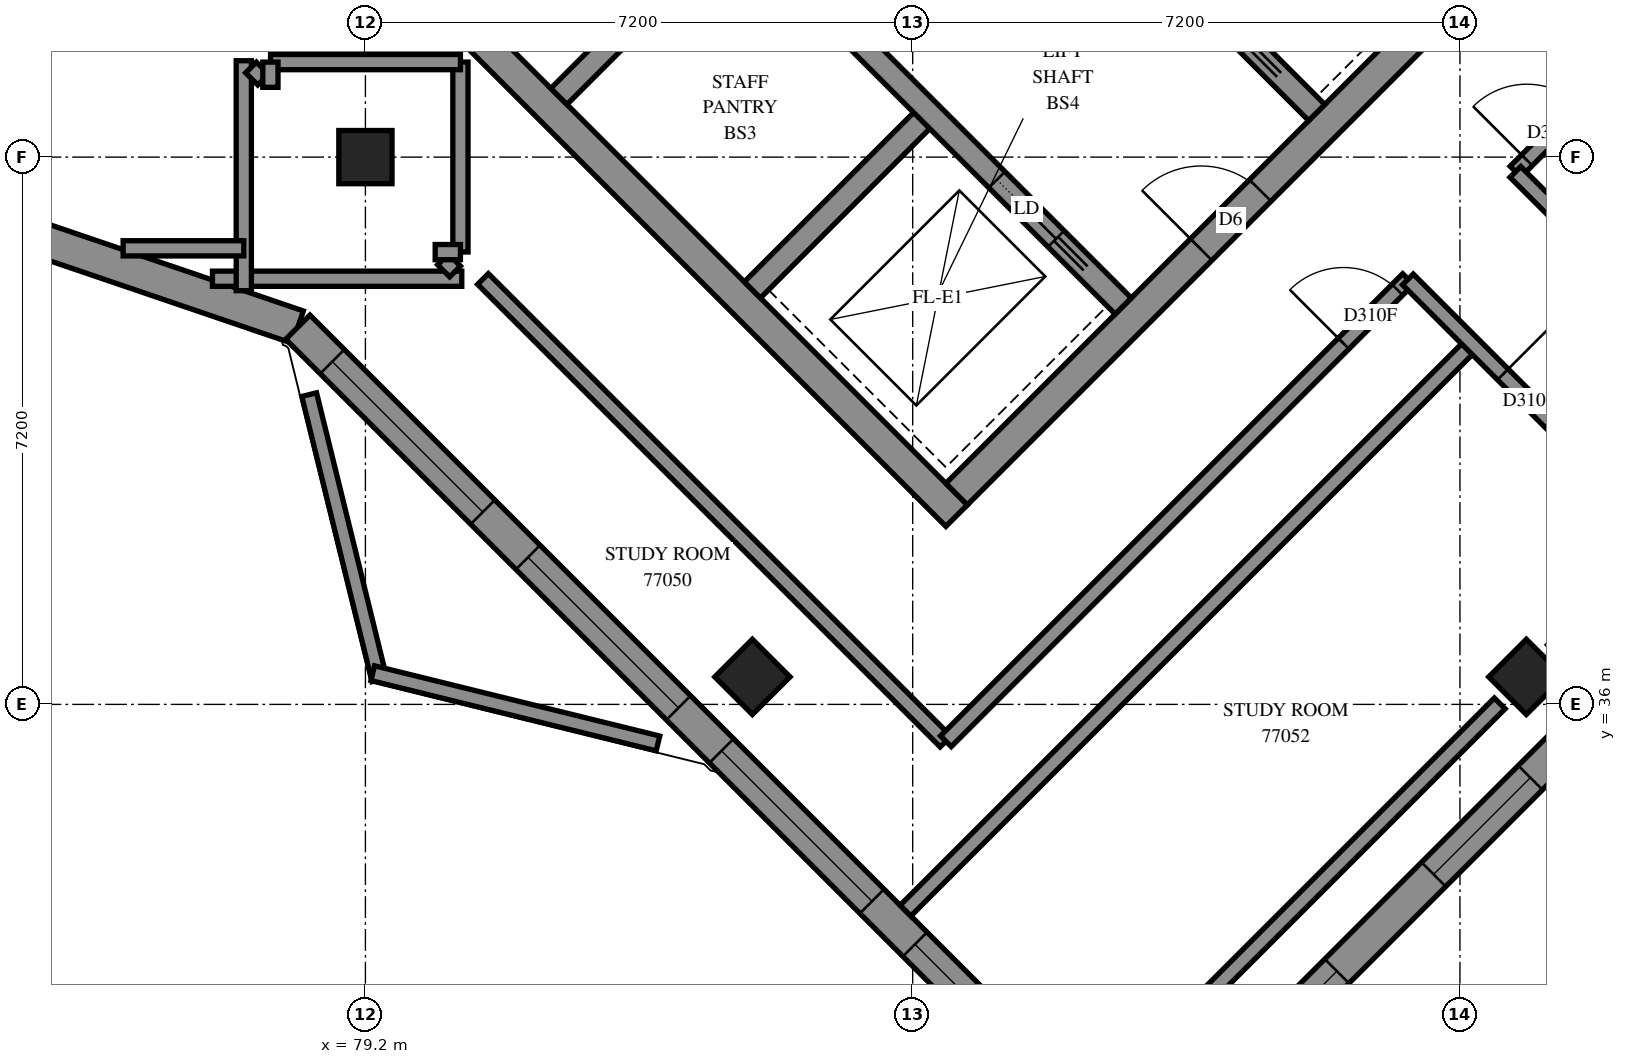
"""IFC4 building model, lengths in metres.
Left out: names, types, materials, properties, quantities, classifications, styles, units other than length and angle.
Written with IfcOpenShell. Run it as: python <this file> out.ifc"""

import sys

from ifc_helpers import new_model, si_unit, direction, frame, frame_2d, origin, origin_2d, place, context, subcontext, project, spatial, polyline, rectangle, outline, extrude, element, fill, save


model = new_model("IFC4")
c1 = context("Model", 3, precision=1e-05, world=origin(), true_north=direction((0.0, 1.0)))
c2 = subcontext(c1, "Body", "Model", "MODEL_VIEW")
j1 = project(units=[si_unit("LENGTHUNIT", "METRE"), si_unit("PLANEANGLEUNIT", "RADIAN")], contexts=[c1])
p1 = place(None, origin())
s1 = spatial("IfcSite", under=j1, at=p1, CompositionType="ELEMENT")
p2 = place(p1, origin())
s2 = spatial("IfcBuilding", under=s1, at=p2, CompositionType="ELEMENT")
p3 = place(p2, frame((0.0, 0.0, 281.2)))
s3 = spatial("IfcBuildingStorey", under=s2, at=p3, CompositionType="ELEMENT", Elevation=281.2)
for number, where, z_axis, x_axis in (
    (1, (79.2, 43.2, 0.0), (0.0, 0.0, 1.0), (1.0, 0.0, 0.0)),
    (2, (84.291, 36.362, 0.0), (0.0, 0.0, 1.0), (0.707, -0.707, 0.0)),
    (3, (94.474, 36.362, 0.0), (0.0, 0.0, 1.0), (0.707, -0.707, 0.0)),
):
    element("IfcColumn", number, at=place(p3, frame(where, z_axis=z_axis, x_axis=x_axis)), inside=s3, PredefinedType="COLUMN", context=c2, shape_type="SweptSolid", body=[
        extrude(rectangle(XDim=0.7, YDim=0.7, at=origin_2d()), origin(), (0.0, 0.0, 1.0), 3.1),
    ])
p4 = place(p3, frame((76.23, 49.231, -0.3), z_axis=(0.0, 0.0, 1.0), x_axis=(0.7071034917, -0.7071100706, 0.0)))
e4 = element("IfcWall", 4, at=p4, inside=s3, PredefinedType="SHEAR", context=c2, shape_type="SweptSolid", body=[
    extrude(rectangle(XDim=15.2, YDim=0.4, at=frame_2d((7.6, 0.0))), origin(), (0.0, 0.0, 1.0), 2.7),
])
p5 = place(p3, frame((86.978, 38.766, -0.3), z_axis=(0.0, 0.0, 1.0), x_axis=(0.7071067812, 0.7071067812, 0.0)))
e5 = element("IfcWall", 5, at=p5, inside=s3, PredefinedType="SHEAR", context=c2, shape_type="SweptSolid", body=[
    extrude(rectangle(XDim=14.4, YDim=0.4, at=frame_2d((7.2, 0.0))), origin(), (0.0, 0.0, 1.0), 2.7),
])
p6 = place(p5, frame((4.55, 0.0, 0.3)))
e6 = element("IfcOpeningElement", 6, at=p6, cuts=e5, PredefinedType="OPENING", context=c2, shape_type="SweptSolid", body=[
    extrude(rectangle(XDim=1.1, YDim=2.1, at=frame_2d((0.55, 1.05))), frame((0.0, 0.21, 0.0), z_axis=(0.0, -1.0, 0.0), x_axis=(1.0, 0.0, 0.0)), (0.0, 0.0, 1.0), 0.42),
])
p7 = place(p5, frame((11.35, 0.0, 0.3)))
e7 = element("IfcOpeningElement", 7, at=p7, cuts=e5, PredefinedType="OPENING", context=c2, shape_type="SweptSolid", body=[
    extrude(rectangle(XDim=1.1, YDim=2.1, at=frame_2d((0.55, 1.05))), frame((0.0, 0.21, 0.0), z_axis=(0.0, -1.0, 0.0), x_axis=(1.0, 0.0, 0.0)), (0.0, 0.0, 1.0), 0.42),
])
for number, where, z_axis, x_axis in (
    (8, (81.746, 43.999, 0.0), (0.0, 0.0, 1.0), (0.707, 0.707, 0.0)),
    (9, (84.291, 41.453, 0.0), (0.0, 0.0, 1.0), (0.707, 0.707, 0.0)),
):
    element("IfcWall", number, at=place(p3, frame(where, z_axis=z_axis, x_axis=x_axis)), inside=s3, PredefinedType="SOLIDWALL", context=c2, shape_type="SweptSolid", body=[
        extrude(rectangle(XDim=3.3, YDim=0.3, at=frame_2d((1.65, 0.0))), origin(), (0.0, 0.0, 1.0), 3.1),
    ])
p8 = place(p3, frame((78.988, 51.423, 0.0), z_axis=(0.0, 0.0, 1.0), x_axis=(0.7071067812, -0.7071067812, 0.0)))
e10 = element("IfcWall", 10, at=p8, inside=s3, PredefinedType="SOLIDWALL", context=c2, shape_type="SweptSolid", body=[
    extrude(rectangle(XDim=14.4, YDim=0.3, at=frame_2d((7.2, 0.0))), origin(), (0.0, 0.0, 1.0), 3.1),
])
p9 = place(p8, frame((1.35, 0.0, 0.0)))
e11 = element("IfcOpeningElement", 11, at=p9, cuts=e10, PredefinedType="OPENING", context=c2, shape_type="SweptSolid", body=[
    extrude(rectangle(XDim=0.9, YDim=2.1, at=frame_2d((0.45, 1.05))), frame((0.0, 0.16, 0.0), z_axis=(0.0, -1.0, 0.0), x_axis=(1.0, 0.0, 0.0)), (0.0, 0.0, 1.0), 0.32),
])
p10 = place(p8, frame((4.95, 0.0, 0.0)))
e12 = element("IfcOpeningElement", 12, at=p10, cuts=e10, PredefinedType="OPENING", context=c2, shape_type="SweptSolid", body=[
    extrude(rectangle(XDim=0.9, YDim=2.1, at=frame_2d((0.45, 1.05))), frame((0.0, 0.16, 0.0), z_axis=(0.0, -1.0, 0.0), x_axis=(1.0, 0.0, 0.0)), (0.0, 0.0, 1.0), 0.32),
])
p11 = place(p8, frame((8.55, 0.0, 0.0)))
e13 = element("IfcOpeningElement", 13, at=p11, cuts=e10, PredefinedType="OPENING", context=c2, shape_type="SweptSolid", body=[
    extrude(rectangle(XDim=0.9, YDim=2.1, at=frame_2d((0.45, 1.05))), frame((0.0, 0.16, 0.0), z_axis=(0.0, -1.0, 0.0), x_axis=(1.0, 0.0, 0.0)), (0.0, 0.0, 1.0), 0.32),
])
p12 = place(p8, frame((12.05, 0.0, 0.0)))
e14 = element("IfcOpeningElement", 14, at=p12, cuts=e10, PredefinedType="OPENING", context=c2, shape_type="SweptSolid", body=[
    extrude(rectangle(XDim=1.1, YDim=2.1, at=frame_2d((0.55, 1.05))), frame((0.0, 0.16, 0.0), z_axis=(0.0, -1.0, 0.0), x_axis=(1.0, 0.0, 0.0)), (0.0, 0.0, 1.0), 0.32),
])
p13 = place(p3, frame((81.534, 53.969, 0.0), z_axis=(0.0, 0.0, 1.0), x_axis=(0.707103309, -0.7071102534, 0.0)))
e15 = element("IfcWall", 15, at=p13, inside=s3, PredefinedType="SOLIDWALL", context=c2, shape_type="SweptSolid", body=[
    extrude(rectangle(XDim=14.4, YDim=0.3, at=frame_2d((7.2, 0.0))), origin(), (0.0, 0.0, 1.0), 3.1),
])
p14 = place(p13, frame((8.55, 0.0, 0.0)))
e16 = element("IfcOpeningElement", 16, at=p14, cuts=e15, PredefinedType="OPENING", context=c2, shape_type="SweptSolid", body=[
    extrude(rectangle(XDim=0.9, YDim=2.1, at=frame_2d((0.45, 1.05))), frame((0.0, 0.16, 0.0), z_axis=(0.0, -1.0, 0.0), x_axis=(1.0, 0.0, 0.0)), (0.0, 0.0, 1.0), 0.32),
])
p15 = place(p13, frame((1.25, 0.0, 0.0)))
e17 = element("IfcOpeningElement", 17, at=p15, cuts=e15, PredefinedType="OPENING", context=c2, shape_type="SweptSolid", body=[
    extrude(rectangle(XDim=1.1, YDim=2.1, at=frame_2d((0.55, 1.05))), frame((0.0, 0.16, 0.0), z_axis=(0.0, -1.0, 0.0), x_axis=(1.0, 0.0, 0.0)), (0.0, 0.0, 1.0), 0.32),
])
p16 = place(p13, frame((4.85, 0.0, 0.0)))
e18 = element("IfcOpeningElement", 18, at=p16, cuts=e15, PredefinedType="OPENING", context=c2, shape_type="SweptSolid", body=[
    extrude(rectangle(XDim=1.1, YDim=2.1, at=frame_2d((0.55, 1.05))), frame((0.0, 0.16, 0.0), z_axis=(0.0, -1.0, 0.0), x_axis=(1.0, 0.0, 0.0)), (0.0, 0.0, 1.0), 0.32),
])
p17 = place(p13, frame((12.05, 0.0, 0.0)))
e19 = element("IfcOpeningElement", 19, at=p17, cuts=e15, PredefinedType="OPENING", context=c2, shape_type="SweptSolid", body=[
    extrude(rectangle(XDim=1.1, YDim=2.1, at=frame_2d((0.55, 1.05))), frame((0.0, 0.16, 0.0), z_axis=(0.0, -1.0, 0.0), x_axis=(1.0, 0.0, 0.0)), (0.0, 0.0, 1.0), 0.32),
])
p18 = place(p3, frame((89.382, 29.892, 0.0), z_axis=(0.0, 0.0, 1.0), x_axis=(0.7071067812, 0.7071067812, 0.0)))
e20 = element("IfcWall", 20, at=p18, inside=s3, PredefinedType="SOLIDWALL", context=c2, shape_type="SweptSolid", body=[
    extrude(outline(polyline([(-0.225, -0.225), (9.375, -0.225), (9.481, 0.225), (0.225, 0.225), (-0.225, -0.225)])), origin(), (0.0, 0.0, 1.0), 2.6),
])
p19 = place(p18, frame((1.875, 0.0, 0.6)))
e21 = element("IfcOpeningElement", 21, at=p19, cuts=e20, PredefinedType="OPENING", context=c2, shape_type="SweptSolid", body=[
    extrude(rectangle(XDim=1.8, YDim=1.9, at=frame_2d((0.9, 0.95))), frame((0.0, 0.235, 0.0), z_axis=(0.0, -1.0, 0.0), x_axis=(1.0, 0.0, 0.0)), (0.0, 0.0, 1.0), 0.47),
])
p20 = place(p18, frame((5.475, 0.0, 0.6)))
e22 = element("IfcOpeningElement", 22, at=p20, cuts=e20, PredefinedType="OPENING", context=c2, shape_type="SweptSolid", body=[
    extrude(rectangle(XDim=1.8, YDim=1.9, at=frame_2d((0.9, 0.95))), frame((0.0, 0.235, 0.0), z_axis=(0.0, -1.0, 0.0), x_axis=(1.0, 0.0, 0.0)), (0.0, 0.0, 1.0), 0.47),
])
p21 = place(p3, frame((74.583, 42.231, 0.0), z_axis=(0.0, 0.0, 1.0), x_axis=(0.9466967117, -0.3221262734, 0.0)))
e23 = element("IfcWall", 23, at=p21, inside=s3, PredefinedType="SOLIDWALL", context=c2, shape_type="SweptSolid", body=[
    extrude(outline(polyline([(0.058, -0.225), (3.885, -0.225), (3.99, 0.225), (-0.058, 0.225), (0.058, -0.225)])), origin(), (0.0, 0.0, 1.0), 3.1),
])
p22 = place(p3, frame((78.311, 40.963, 0.0), z_axis=(0.0, 0.0, 1.0), x_axis=(0.7071067812, -0.7071067812, 0.0)))
e24 = element("IfcWall", 24, at=p22, inside=s3, PredefinedType="SOLIDWALL", context=c2, shape_type="SweptSolid", body=[
    extrude(outline(polyline([(0.052, -0.225), (15.882, -0.225), (15.432, 0.225), (-0.052, 0.225), (0.052, -0.225)])), origin(), (0.0, 0.0, 1.0), 3.1),
])
p23 = place(p22, frame((0.641, 0.0, 0.45)))
e25 = element("IfcOpeningElement", 25, at=p23, cuts=e24, PredefinedType="OPENING", context=c2, shape_type="SweptSolid", body=[
    extrude(rectangle(XDim=2.8, YDim=2.55, at=frame_2d((1.4, 1.275))), frame((0.0, 0.235, 0.0), z_axis=(0.0, -1.0, 0.0), x_axis=(1.0, 0.0, 0.0)), (0.0, 0.0, 1.0), 0.47),
])
p24 = place(p22, frame((4.282, 0.0, 0.45)))
e26 = element("IfcOpeningElement", 26, at=p24, cuts=e24, PredefinedType="OPENING", context=c2, shape_type="SweptSolid", body=[
    extrude(rectangle(XDim=2.8, YDim=2.55, at=frame_2d((1.4, 1.275))), frame((0.0, 0.235, 0.0), z_axis=(0.0, -1.0, 0.0), x_axis=(1.0, 0.0, 0.0)), (0.0, 0.0, 1.0), 0.47),
])
p25 = place(p22, frame((7.882, 0.0, 0.45)))
e27 = element("IfcOpeningElement", 27, at=p25, cuts=e24, PredefinedType="OPENING", context=c2, shape_type="SweptSolid", body=[
    extrude(rectangle(XDim=2.8, YDim=2.55, at=frame_2d((1.4, 1.275))), frame((0.0, 0.235, 0.0), z_axis=(0.0, -1.0, 0.0), x_axis=(1.0, 0.0, 0.0)), (0.0, 0.0, 1.0), 0.47),
])
p26 = place(p22, frame((11.482, 0.0, 0.45)))
e28 = element("IfcOpeningElement", 28, at=p26, cuts=e24, PredefinedType="OPENING", context=c2, shape_type="SweptSolid", body=[
    extrude(rectangle(XDim=2.8, YDim=2.55, at=frame_2d((1.4, 1.275))), frame((0.0, 0.235, 0.0), z_axis=(0.0, -1.0, 0.0), x_axis=(1.0, 0.0, 0.0)), (0.0, 0.0, 1.0), 0.47),
])
p27 = place(p3, frame((86.306, 33.287, 0.0), z_axis=(0.0, 0.0, 1.0), x_axis=(0.7071020418, 0.7071115206, 0.0)))
e29 = element("IfcWall", 29, at=p27, inside=s3, PredefinedType="PARTITIONING", context=c2, shape_type="SweptSolid", body=[
    extrude(rectangle(XDim=10.55, YDim=0.2, at=frame_2d((5.275, 0.0))), origin(), (0.0, 0.0, 1.0), 3.1),
])
p28 = place(p3, frame((80.747, 41.597, 0.0), z_axis=(0.0, 0.0, 1.0), x_axis=(0.7071067812, -0.7071067812, 0.0)))
e30 = element("IfcWall", 30, at=p28, inside=s3, PredefinedType="PARTITIONING", context=c2, shape_type="SweptSolid", body=[
    extrude(rectangle(XDim=8.607, YDim=0.2, at=frame_2d((4.303, 0.0))), origin(), (0.0, 0.0, 1.0), 3.1),
])
p29 = place(p3, frame((94.331, 43.009, 0.0), z_axis=(0.0, 0.0, 1.0), x_axis=(0.7071067812, 0.7071067812, 0.0)))
e31 = element("IfcWall", 31, at=p29, inside=s3, PredefinedType="PARTITIONING", context=c2, shape_type="SweptSolid", body=[
    extrude(rectangle(XDim=8.601, YDim=0.2, at=frame_2d((4.301, 0.0))), origin(), (0.0, 0.0, 1.0), 3.1),
])
p30 = place(p29, frame((0.212, 0.0, 0.0)))
e32 = element("IfcOpeningElement", 32, at=p30, cuts=e31, PredefinedType="OPENING", context=c2, shape_type="SweptSolid", body=[
    extrude(rectangle(XDim=1.0, YDim=2.1, at=frame_2d((0.5, 1.05))), frame((0.0, 0.11, 0.0), z_axis=(0.0, -1.0, 0.0), x_axis=(1.0, 0.0, 0.0)), (0.0, 0.0, 1.0), 0.22),
])
p31 = place(p3, frame((86.837, 35.515, 0.0), z_axis=(0.0, 0.0, 1.0), x_axis=(0.7071067812, 0.7071067812, 0.0)))
e33 = element("IfcWall", 33, at=p31, inside=s3, PredefinedType="PARTITIONING", context=c2, shape_type="SweptSolid", body=[
    extrude(rectangle(XDim=8.598, YDim=0.2, at=frame_2d((4.299, 0.0))), origin(), (0.0, 0.0, 1.0), 3.1),
])
p32 = place(p31, frame((7.4, 0.0, 0.0)))
e34 = element("IfcOpeningElement", 34, at=p32, cuts=e33, PredefinedType="OPENING", context=c2, shape_type="SweptSolid", body=[
    extrude(rectangle(XDim=1.0, YDim=2.1, at=frame_2d((0.5, 1.05))), frame((0.0, 0.11, 0.0), z_axis=(0.0, -1.0, 0.0), x_axis=(1.0, 0.0, 0.0)), (0.0, 0.0, 1.0), 0.22),
])
p33 = place(p3, frame((89.731, 31.621, 0.0), z_axis=(0.0, 0.0, 1.0), x_axis=(0.7071067812, 0.7071067812, 0.0)))
e35 = element("IfcWall", 35, at=p33, inside=s3, PredefinedType="PARTITIONING", context=c2, shape_type="SweptSolid", body=[
    extrude(rectangle(XDim=6.211, YDim=0.2, at=frame_2d((3.106, 0.0))), origin(), (0.0, 0.0, 1.0), 2.6),
])
p34 = place(p3, frame((92.915, 41.591, 0.0), z_axis=(0.0, 0.0, 1.0), x_axis=(0.7071067812, -0.7071067812, 0.0)))
e36 = element("IfcWall", 36, at=p34, inside=s3, PredefinedType="PARTITIONING", context=c2, shape_type="SweptSolid", body=[
    extrude(rectangle(XDim=4.8, YDim=0.2, at=frame_2d((2.4, 0.0))), origin(), (0.0, 0.0, 1.0), 3.1),
])
p35 = place(p34, frame((1.767, 0.0, 0.0)))
e37 = element("IfcOpeningElement", 37, at=p35, cuts=e36, PredefinedType="OPENING", context=c2, shape_type="SweptSolid", body=[
    extrude(rectangle(XDim=1.0, YDim=2.1, at=frame_2d((0.5, 1.05))), frame((0.0, 0.11, 0.0), z_axis=(0.0, -1.0, 0.0), x_axis=(1.0, 0.0, 0.0)), (0.0, 0.0, 1.0), 0.22),
])
p36 = place(p3, frame((94.329, 43.005, 0.0), z_axis=(0.0, 0.0, 1.0), x_axis=(0.7071067812, -0.7071067812, 0.0)))
e38 = element("IfcWall", 38, at=p36, inside=s3, PredefinedType="PARTITIONING", context=c2, shape_type="SweptSolid", body=[
    extrude(rectangle(XDim=4.8, YDim=0.2, at=frame_2d((2.4, 0.0))), origin(), (0.0, 0.0, 1.0), 3.1),
])
p37 = place(p36, frame((1.707, 0.0, 0.0)))
e39 = element("IfcOpeningElement", 39, at=p37, cuts=e38, PredefinedType="OPENING", context=c2, shape_type="SweptSolid", body=[
    extrude(rectangle(XDim=1.0, YDim=2.1, at=frame_2d((0.5, 1.05))), frame((0.0, 0.11, 0.0), z_axis=(0.0, -1.0, 0.0), x_axis=(1.0, 0.0, 0.0)), (0.0, 0.0, 1.0), 0.22),
])
p38 = place(p3, frame((77.188, 41.6, 0.0), z_axis=(0.0, 0.0, 1.0), x_axis=(1.0, 0.0, 0.0)))
e40 = element("IfcWall", 40, at=p38, inside=s3, PredefinedType="PARTITIONING", context=c2, shape_type="SweptSolid", body=[
    extrude(rectangle(XDim=3.28, YDim=0.2, at=frame_2d((1.64, 0.0))), origin(), (0.0, 0.0, 1.0), 3.1),
])
p39 = place(p3, frame((77.6, 41.443, 0.0), z_axis=(0.0, 0.0, 1.0), x_axis=(0.0, 1.0, 0.0)))
e41 = element("IfcWall", 41, at=p39, inside=s3, PredefinedType="PARTITIONING", context=c2, shape_type="SweptSolid", body=[
    extrude(rectangle(XDim=3.025, YDim=0.2, at=frame_2d((1.513, 0.0))), origin(), (0.0, 0.0, 1.0), 3.1),
])
for number, where, z_axis, x_axis in (
    (42, (80.45, 41.952, 0.0), (0.0, 0.0, 1.0), (0.0, 1.0, 0.0)),
    (43, (77.952, 44.45, 0.0), (0.0, 0.0, 1.0), (1.0, 0.0, 0.0)),
):
    element("IfcWall", number, at=place(p3, frame(where, z_axis=z_axis, x_axis=x_axis)), inside=s3, PredefinedType="PARTITIONING", context=c2, shape_type="SweptSolid", body=[
        extrude(rectangle(XDim=2.498, YDim=0.2, at=frame_2d((1.249, 0.0))), origin(), (0.0, 0.0, 1.0), 3.1),
    ])
p40 = place(p3, frame((76.012, 42.0, 0.0), z_axis=(0.0, 0.0, 1.0), x_axis=(1.0, 0.0, 0.0)))
e44 = element("IfcWall", 44, at=p40, inside=s3, PredefinedType="PARTITIONING", context=c2, shape_type="SweptSolid", body=[
    extrude(rectangle(XDim=1.588, YDim=0.2, at=frame_2d((0.794, 0.0))), origin(), (0.0, 0.0, 1.0), 3.1),
])
for number, where, z_axis, x_axis in (
    (45, (80.221, 41.855, 0.0), (0.0, 0.0, 1.0), (0.707, -0.707, 0.0)),
    (46, (77.695, 44.38, 0.0), (0.0, 0.0, 1.0), (0.707, -0.707, 0.0)),
):
    element("IfcWall", number, at=place(p3, frame(where, z_axis=z_axis, x_axis=x_axis)), inside=s3, PredefinedType="PARTITIONING", context=c2, shape_type="SweptSolid", body=[
        extrude(rectangle(XDim=0.225, YDim=0.2, at=frame_2d((0.112, 0.0))), origin(), (0.0, 0.0, 1.0), 3.1),
    ])
for number, where, z_axis, x_axis in (
    (47, (80.118, 41.95, 0.0), (0.0, 0.0, 1.0), (1.0, 0.0, 0.0)),
    (48, (77.95, 44.118, 0.0), (0.0, 0.0, 1.0), (0.0, 1.0, 0.0)),
):
    element("IfcWall", number, at=place(p3, frame(where, z_axis=z_axis, x_axis=x_axis)), inside=s3, PredefinedType="PARTITIONING", context=c2, shape_type="SweptSolid", body=[
        extrude(rectangle(XDim=0.332, YDim=0.2, at=frame_2d((0.166, 0.0))), origin(), (0.0, 0.0, 1.0), 3.1),
    ])
for number, where, z_axis, x_axis in (
    (49, (79.384, 36.323, 0.0), (0.0, 0.0, 1.0), (-0.239, 0.971, 0.0)),
    (50, (83.049, 35.487, 0.0), (0.0, 0.0, 1.0), (-0.971, 0.239, 0.0)),
):
    element("IfcWall", number, at=place(p3, frame(where, z_axis=z_axis, x_axis=x_axis)), inside=s3, PredefinedType="PARAPET", context=c2, shape_type="SweptSolid", body=[
        extrude(rectangle(XDim=3.865, YDim=0.2, at=frame_2d((1.932, 0.0))), origin(), (0.0, 0.0, 1.0), 0.2),
    ])
p41 = place(p19, origin())
e51 = element("IfcWindow", 51, at=p41, inside=s3, PartitioningType="SINGLE_PANEL", PredefinedType="WINDOW", context=c2, shape_type="SweptSolid", body=[
    extrude(rectangle(XDim=1.8, YDim=1.9, at=frame_2d((0.9, 0.95))), frame((0.0, 0.205, 0.0), z_axis=(0.0, -1.0, 0.0), x_axis=(1.0, 0.0, 0.0)), (0.0, 0.0, 1.0), 0.06),
])
fill(e21, e51)
p42 = place(p20, origin())
e52 = element("IfcWindow", 52, at=p42, inside=s3, PartitioningType="SINGLE_PANEL", PredefinedType="WINDOW", context=c2, shape_type="SweptSolid", body=[
    extrude(rectangle(XDim=1.8, YDim=1.9, at=frame_2d((0.9, 0.95))), frame((0.0, 0.205, 0.0), z_axis=(0.0, -1.0, 0.0), x_axis=(1.0, 0.0, 0.0)), (0.0, 0.0, 1.0), 0.06),
])
fill(e22, e52)
p43 = place(p23, origin())
e53 = element("IfcWindow", 53, at=p43, inside=s3, PartitioningType="SINGLE_PANEL", PredefinedType="WINDOW", context=c2, shape_type="SweptSolid", body=[
    extrude(rectangle(XDim=2.8, YDim=2.55, at=frame_2d((1.4, 1.275))), frame((0.0, 0.205, 0.0), z_axis=(0.0, -1.0, 0.0), x_axis=(1.0, 0.0, 0.0)), (0.0, 0.0, 1.0), 0.06),
])
fill(e25, e53)
p44 = place(p24, origin())
e54 = element("IfcWindow", 54, at=p44, inside=s3, PartitioningType="SINGLE_PANEL", PredefinedType="WINDOW", context=c2, shape_type="SweptSolid", body=[
    extrude(rectangle(XDim=2.8, YDim=2.55, at=frame_2d((1.4, 1.275))), frame((0.0, 0.205, 0.0), z_axis=(0.0, -1.0, 0.0), x_axis=(1.0, 0.0, 0.0)), (0.0, 0.0, 1.0), 0.06),
])
fill(e26, e54)
p45 = place(p25, origin())
e55 = element("IfcWindow", 55, at=p45, inside=s3, PartitioningType="SINGLE_PANEL", PredefinedType="WINDOW", context=c2, shape_type="SweptSolid", body=[
    extrude(rectangle(XDim=2.8, YDim=2.55, at=frame_2d((1.4, 1.275))), frame((0.0, 0.205, 0.0), z_axis=(0.0, -1.0, 0.0), x_axis=(1.0, 0.0, 0.0)), (0.0, 0.0, 1.0), 0.06),
])
fill(e27, e55)
p46 = place(p26, origin())
e56 = element("IfcWindow", 56, at=p46, inside=s3, PartitioningType="SINGLE_PANEL", PredefinedType="WINDOW", context=c2, shape_type="SweptSolid", body=[
    extrude(rectangle(XDim=2.8, YDim=2.55, at=frame_2d((1.4, 1.275))), frame((0.0, 0.205, 0.0), z_axis=(0.0, -1.0, 0.0), x_axis=(1.0, 0.0, 0.0)), (0.0, 0.0, 1.0), 0.06),
])
fill(e28, e56)
p47 = place(p6, origin())
e57 = element("IfcDoor", 57, at=p47, inside=s3, OperationType="DOUBLE_DOOR_SINGLE_SWING", PredefinedType="DOOR", context=c2, shape_type="SweptSolid", body=[
    extrude(rectangle(XDim=1.1, YDim=2.1, at=frame_2d((0.55, 1.05))), frame((0.0, 0.025, 0.0), z_axis=(0.0, -1.0, 0.0), x_axis=(1.0, 0.0, 0.0)), (0.0, 0.0, 1.0), 0.05),
])
fill(e6, e57)
p48 = place(p12, origin())
e58 = element("IfcDoor", 58, at=p48, inside=s3, OperationType="SLIDING_TO_RIGHT", PredefinedType="DOOR", context=c2, shape_type="SweptSolid", body=[
    extrude(rectangle(XDim=1.1, YDim=2.1, at=frame_2d((0.55, 1.05))), frame((0.0, 0.025, 0.0), z_axis=(0.0, -1.0, 0.0), x_axis=(1.0, 0.0, 0.0)), (0.0, 0.0, 1.0), 0.05),
])
fill(e14, e58)
p49 = place(p30, origin())
e59 = element("IfcDoor", 59, at=p49, inside=s3, OperationType="SINGLE_SWING_LEFT", PredefinedType="DOOR", context=c2, shape_type="SweptSolid", body=[
    extrude(rectangle(XDim=1.0, YDim=2.1, at=frame_2d((0.5, 1.05))), frame((0.0, 0.025, 0.0), z_axis=(0.0, -1.0, 0.0), x_axis=(1.0, 0.0, 0.0)), (0.0, 0.0, 1.0), 0.05),
])
fill(e32, e59)
p50 = place(p32, origin())
e60 = element("IfcDoor", 60, at=p50, inside=s3, OperationType="SINGLE_SWING_LEFT", PredefinedType="DOOR", context=c2, shape_type="SweptSolid", body=[
    extrude(rectangle(XDim=1.0, YDim=2.1, at=frame_2d((0.5, 1.05))), frame((0.0, 0.025, 0.0), z_axis=(0.0, -1.0, 0.0), x_axis=(1.0, 0.0, 0.0)), (0.0, 0.0, 1.0), 0.05),
])
fill(e34, e60)
p51 = place(p35, origin())
e61 = element("IfcDoor", 61, at=p51, inside=s3, OperationType="SINGLE_SWING_LEFT", PredefinedType="DOOR", context=c2, shape_type="SweptSolid", body=[
    extrude(rectangle(XDim=1.0, YDim=2.1, at=frame_2d((0.5, 1.05))), frame((0.0, 0.025, 0.0), z_axis=(0.0, -1.0, 0.0), x_axis=(1.0, 0.0, 0.0)), (0.0, 0.0, 1.0), 0.05),
])
fill(e37, e61)
save(model, sys.argv[1])
